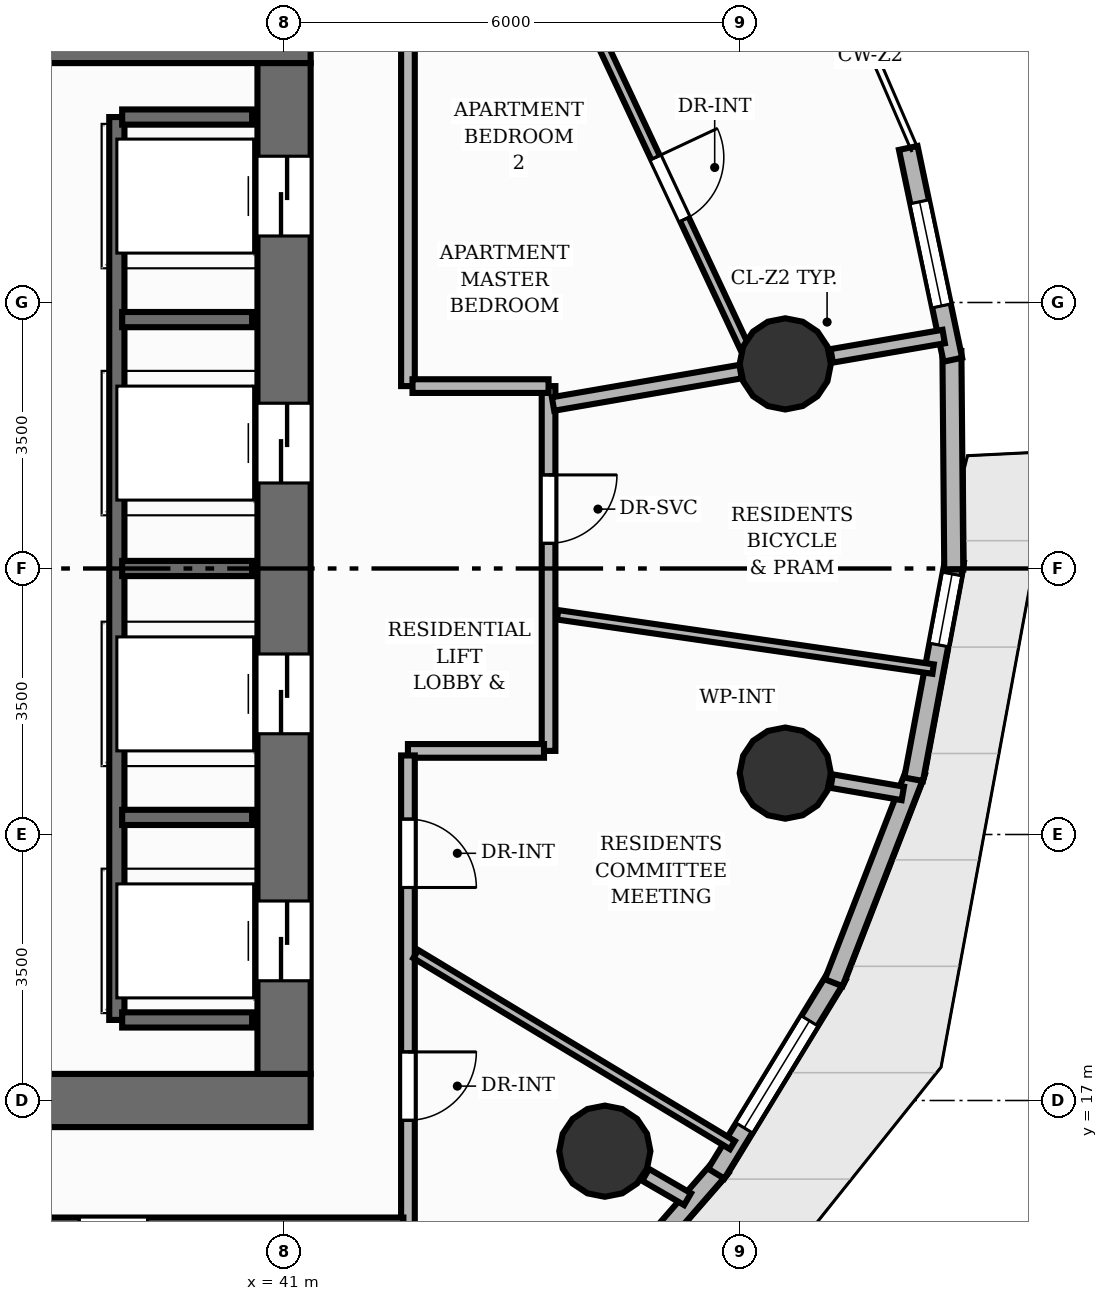
"""IFC4 building model, lengths in metres.
Left out: names, types, materials, properties, quantities, classifications, styles, units other than length and angle.
Written with IfcOpenShell. Run it as: python <this file> out.ifc"""

import sys

from ifc_helpers import new_model, si_unit, direction, frame, frame_2d, origin, origin_2d, place, context, subcontext, project, spatial, rectangle, circle, extrude, element, fill, save


model = new_model("IFC4")
c1 = context("Model", 3, precision=1e-05, world=origin(), true_north=direction((0.0, 1.0)))
c2 = subcontext(c1, "Body", "Model", "MODEL_VIEW")
j1 = project(units=[si_unit("LENGTHUNIT", "METRE"), si_unit("PLANEANGLEUNIT", "RADIAN")], contexts=[c1])
p1 = place(None, origin())
s1 = spatial("IfcSite", under=j1, at=p1, CompositionType="ELEMENT")
p2 = place(p1, origin())
s2 = spatial("IfcBuilding", under=s1, at=p2, CompositionType="ELEMENT")
p3 = place(p2, frame((0.0, 0.0, 77.28)))
s3 = spatial("IfcBuildingStorey", under=s2, at=p3, CompositionType="ELEMENT", Elevation=77.28)
p4 = place(p3, frame((22.65, 17.0, 0.0), z_axis=(0.0, 0.0, 1.0), x_axis=(1.0, 0.0, 0.0)))
e1 = element("IfcWall", 1, at=p4, inside=s3, PredefinedType="SHEAR", context=c2, shape_type="SweptSolid", body=[
    extrude(rectangle(XDim=18.7, YDim=0.7, at=frame_2d((9.35, 0.0))), origin(), (0.0, 0.0, 1.0), 3.2),
])
p5 = place(p4, frame((5.85, 0.0, 0.0)))
e2 = element("IfcOpeningElement", 2, at=p5, cuts=e1, PredefinedType="OPENING", context=c2, shape_type="SweptSolid", body=[
    extrude(rectangle(XDim=1.1, YDim=2.15, at=frame_2d((0.55, 1.075))), frame((0.0, 0.36, 0.0), z_axis=(0.0, -1.0, 0.0), x_axis=(1.0, 0.0, 0.0)), (0.0, 0.0, 1.0), 0.72),
])
p6 = place(p4, frame((9.4, 0.0, 0.0)))
e3 = element("IfcOpeningElement", 3, at=p6, cuts=e1, PredefinedType="OPENING", context=c2, shape_type="SweptSolid", body=[
    extrude(rectangle(XDim=0.9, YDim=2.1, at=frame_2d((0.45, 1.05))), frame((0.0, 0.36, 0.0), z_axis=(0.0, -1.0, 0.0), x_axis=(1.0, 0.0, 0.0)), (0.0, 0.0, 1.0), 0.72),
])
p7 = place(p3, frame((22.65, 31.0, 0.0), z_axis=(0.0, 0.0, 1.0), x_axis=(1.0, 0.0, 0.0)))
e4 = element("IfcWall", 4, at=p7, inside=s3, PredefinedType="SHEAR", context=c2, shape_type="SweptSolid", body=[
    extrude(rectangle(XDim=18.7, YDim=0.7, at=frame_2d((9.35, 0.0))), origin(), (0.0, 0.0, 1.0), 3.2),
])
p8 = place(p7, frame((11.75, 0.0, 0.0)))
e5 = element("IfcOpeningElement", 5, at=p8, cuts=e4, PredefinedType="OPENING", context=c2, shape_type="SweptSolid", body=[
    extrude(rectangle(XDim=1.1, YDim=2.15, at=frame_2d((0.55, 1.075))), frame((0.0, 0.36, 0.0), z_axis=(0.0, -1.0, 0.0), x_axis=(1.0, 0.0, 0.0)), (0.0, 0.0, 1.0), 0.72),
])
p9 = place(p3, frame((41.0, 17.35, 0.0), z_axis=(0.0, 0.0, 1.0), x_axis=(0.0, 1.0, 0.0)))
e6 = element("IfcWall", 6, at=p9, inside=s3, PredefinedType="SHEAR", context=c2, shape_type="SweptSolid", body=[
    extrude(rectangle(XDim=13.3, YDim=0.7, at=frame_2d((6.65, 0.0))), origin(), (0.0, 0.0, 1.0), 3.2),
])
p10 = place(p9, frame((1.225, 0.0, 0.0)))
e7 = element("IfcOpeningElement", 7, at=p10, cuts=e6, PredefinedType="OPENING", context=c2, shape_type="SweptSolid", body=[
    extrude(rectangle(XDim=1.05, YDim=2.15, at=frame_2d((0.525, 1.075))), frame((0.0, 0.36, 0.0), z_axis=(0.0, -1.0, 0.0), x_axis=(1.0, 0.0, 0.0)), (0.0, 0.0, 1.0), 0.72),
])
p11 = place(p9, frame((4.475, 0.0, 0.0)))
e8 = element("IfcOpeningElement", 8, at=p11, cuts=e6, PredefinedType="OPENING", context=c2, shape_type="SweptSolid", body=[
    extrude(rectangle(XDim=1.05, YDim=2.15, at=frame_2d((0.525, 1.075))), frame((0.0, 0.36, 0.0), z_axis=(0.0, -1.0, 0.0), x_axis=(1.0, 0.0, 0.0)), (0.0, 0.0, 1.0), 0.72),
])
p12 = place(p9, frame((7.775, 0.0, 0.0)))
e9 = element("IfcOpeningElement", 9, at=p12, cuts=e6, PredefinedType="OPENING", context=c2, shape_type="SweptSolid", body=[
    extrude(rectangle(XDim=1.05, YDim=2.15, at=frame_2d((0.525, 1.075))), frame((0.0, 0.36, 0.0), z_axis=(0.0, -1.0, 0.0), x_axis=(1.0, 0.0, 0.0)), (0.0, 0.0, 1.0), 0.72),
])
p13 = place(p9, frame((11.025, 0.0, 0.0)))
e10 = element("IfcOpeningElement", 10, at=p13, cuts=e6, PredefinedType="OPENING", context=c2, shape_type="SweptSolid", body=[
    extrude(rectangle(XDim=1.05, YDim=2.15, at=frame_2d((0.525, 1.075))), frame((0.0, 0.36, 0.0), z_axis=(0.0, -1.0, 0.0), x_axis=(1.0, 0.0, 0.0)), (0.0, 0.0, 1.0), 0.72),
])
for number, where, z_axis, x_axis in (
    (11, (47.594, 26.692, 0.0), (0.0, 0.0, 1.0), (1.0, 0.0, 0.0)),
    (12, (45.22, 16.333, 0.0), (0.0, 0.0, 1.0), (1.0, 0.0, 0.0)),
    (13, (47.594, 21.308, 0.0), (0.0, 0.0, 1.0), (1.0, 0.0, 0.0)),
):
    element("IfcColumn", number, at=place(p3, frame(where, z_axis=z_axis, x_axis=x_axis)), inside=s3, PredefinedType="COLUMN", context=c2, shape_type="SweptSolid", body=[
        extrude(circle(Radius=0.6, at=origin_2d()), origin(), (0.0, 0.0, 1.0), 3.2),
    ])
p14 = place(p3, frame((46.752, 16.127, 0.0), z_axis=(0.0, 0.0, 1.0), x_axis=(-0.656940925155, -0.753942054044, 0.0)))
e14 = element("IfcWall", 14, at=p14, inside=s3, PredefinedType="SOLIDWALL", context=c2, shape_type="SweptSolid", body=[
    extrude(rectangle(XDim=3.131, YDim=0.25, at=frame_2d((1.565, 0.0))), origin(), (0.0, 0.0, 1.0), 2.96),
])
p15 = place(p3, frame((48.281, 18.65, 0.0), z_axis=(0.0, 0.0, 1.0), x_axis=(-0.520956264952, -0.853583370273, 0.0)))
e15 = element("IfcWall", 15, at=p15, inside=s3, PredefinedType="SOLIDWALL", context=c2, shape_type="SweptSolid", body=[
    extrude(rectangle(XDim=3.061, YDim=0.25, at=frame_2d((1.53, 0.0))), origin(), (0.0, 0.0, 1.0), 2.96),
])
p16 = place(p15, frame((0.705, 0.0, 0.85)))
e16 = element("IfcOpeningElement", 16, at=p16, cuts=e15, PredefinedType="OPENING", context=c2, shape_type="SweptSolid", body=[
    extrude(rectangle(XDim=1.65, YDim=1.55, at=frame_2d((0.825, 0.775))), frame((0.0, 0.135, 0.0), z_axis=(0.0, -1.0, 0.0), x_axis=(1.0, 0.0, 0.0)), (0.0, 0.0, 1.0), 0.27),
])
p17 = place(p3, frame((49.314, 21.335, 0.0), z_axis=(0.0, 0.0, 1.0), x_axis=(-0.362414720493, -0.93201693674, 0.0)))
e17 = element("IfcWall", 17, at=p17, inside=s3, PredefinedType="SOLIDWALL", context=c2, shape_type="SweptSolid", body=[
    extrude(rectangle(XDim=2.988, YDim=0.25, at=frame_2d((1.494, 0.0))), origin(), (0.0, 0.0, 1.0), 2.96),
])
p18 = place(p3, frame((49.821, 24.1, 0.0), z_axis=(0.0, 0.0, 1.0), x_axis=(-0.183975908968, -0.982930752861, 0.0)))
e18 = element("IfcWall", 18, at=p18, inside=s3, PredefinedType="SOLIDWALL", context=c2, shape_type="SweptSolid", body=[
    extrude(rectangle(XDim=2.923, YDim=0.25, at=frame_2d((1.462, 0.0))), origin(), (0.0, 0.0, 1.0), 2.96),
])
p19 = place(p18, frame((0.175, 0.0, 0.85)))
e19 = element("IfcOpeningElement", 19, at=p19, cuts=e18, PredefinedType="OPENING", context=c2, shape_type="SweptSolid", body=[
    extrude(rectangle(XDim=0.95, YDim=1.45, at=frame_2d((0.475, 0.725))), frame((0.0, 0.135, 0.0), z_axis=(0.0, -1.0, 0.0), x_axis=(1.0, 0.0, 0.0)), (0.0, 0.0, 1.0), 0.27),
])
p20 = place(p3, frame((49.787, 26.861, 0.0), z_axis=(0.0, 0.0, 1.0), x_axis=(0.008580093639, -0.999963190319, 0.0)))
e20 = element("IfcWall", 20, at=p20, inside=s3, PredefinedType="SOLIDWALL", context=c2, shape_type="SweptSolid", body=[
    extrude(rectangle(XDim=2.874, YDim=0.25, at=frame_2d((1.437, 0.0))), origin(), (0.0, 0.0, 1.0), 2.96),
])
p21 = place(p3, frame((49.213, 29.533, 0.0), z_axis=(0.0, 0.0, 1.0), x_axis=(0.205949984324, -0.978562519187, 0.0)))
e21 = element("IfcWall", 21, at=p21, inside=s3, PredefinedType="SOLIDWALL", context=c2, shape_type="SweptSolid", body=[
    extrude(rectangle(XDim=2.847, YDim=0.25, at=frame_2d((1.424, 0.0))), origin(), (0.0, 0.0, 1.0), 2.96),
])
p22 = place(p21, frame((0.724, 0.0, 0.85)))
e22 = element("IfcOpeningElement", 22, at=p22, cuts=e21, PredefinedType="OPENING", context=c2, shape_type="SweptSolid", body=[
    extrude(rectangle(XDim=1.4, YDim=1.55, at=frame_2d((0.7, 0.775))), frame((0.0, 0.135, 0.0), z_axis=(0.0, -1.0, 0.0), x_axis=(1.0, 0.0, 0.0)), (0.0, 0.0, 1.0), 0.27),
])
p23 = place(p3, frame((38.8, 18.06, 0.0), z_axis=(0.0, 0.0, 1.0), x_axis=(0.0, 1.0, 0.0)))
e23 = element("IfcWall", 23, at=p23, inside=s3, PredefinedType="SHEAR", context=c2, shape_type="SweptSolid", body=[
    extrude(rectangle(XDim=11.88, YDim=0.2, at=frame_2d((5.94, 0.0))), origin(), (0.0, 0.0, 1.0), 3.2),
])
for number, where, z_axis, x_axis in (
    (24, (38.87, 18.06, 0.0), (0.0, 0.0, 1.0), (1.0, 0.0, 0.0)),
    (25, (38.87, 29.94, 0.0), (0.0, 0.0, 1.0), (1.0, 0.0, 0.0)),
    (26, (38.87, 20.725, 0.0), (0.0, 0.0, 1.0), (1.0, 0.0, 0.0)),
    (27, (38.87, 24.0, 0.0), (0.0, 0.0, 1.0), (1.0, 0.0, 0.0)),
    (28, (38.87, 27.275, 0.0), (0.0, 0.0, 1.0), (1.0, 0.0, 0.0)),
):
    element("IfcWall", number, at=place(p3, frame(where, z_axis=z_axis, x_axis=x_axis)), inside=s3, PredefinedType="SHEAR", context=c2, shape_type="SweptSolid", body=[
        extrude(rectangle(XDim=1.71, YDim=0.2, at=frame_2d((0.855, 0.0))), origin(), (0.0, 0.0, 1.0), 3.2),
    ])
p24 = place(p3, frame((48.206, 26.798, 0.0), z_axis=(0.0, 0.0, 1.0), x_axis=(0.985414821555, 0.170169413997, 0.0)))
e29 = element("IfcWall", 29, at=p24, inside=s3, PredefinedType="PARTITIONING", context=c2, shape_type="SweptSolid", body=[
    extrude(rectangle(XDim=1.495, YDim=0.18, at=frame_2d((0.748, 0.0))), origin(), (0.0, 0.0, 1.0), 2.26),
])
p25 = place(p3, frame((45.757, 16.022, 0.0), z_axis=(0.0, 0.0, 1.0), x_axis=(0.864928236137, -0.501895553212, 0.0)))
e30 = element("IfcWall", 30, at=p25, inside=s3, PredefinedType="PARTITIONING", context=c2, shape_type="SweptSolid", body=[
    extrude(rectangle(XDim=0.638, YDim=0.18, at=frame_2d((0.319, 0.0))), origin(), (0.0, 0.0, 1.0), 2.26),
])
p26 = place(p3, frame((48.206, 21.202, 0.0), z_axis=(0.0, 0.0, 1.0), x_axis=(0.985396187556, -0.170277284302, 0.0)))
e31 = element("IfcWall", 31, at=p26, inside=s3, PredefinedType="PARTITIONING", context=c2, shape_type="SweptSolid", body=[
    extrude(rectangle(XDim=0.949, YDim=0.18, at=frame_2d((0.475, 0.0))), origin(), (0.0, 0.0, 1.0), 2.26),
])
p27 = place(p3, frame((44.48, 26.4, 0.0), z_axis=(0.0, 0.0, 1.0), x_axis=(0.0, -1.0, 0.0)))
e32 = element("IfcWall", 32, at=p27, inside=s3, PredefinedType="PARTITIONING", context=c2, shape_type="SweptSolid", body=[
    extrude(rectangle(XDim=4.8, YDim=0.18, at=frame_2d((2.4, 0.0))), origin(), (0.0, 0.0, 1.0), 2.955),
])
p28 = place(p27, frame((1.169, 0.0, 0.0)))
e33 = element("IfcOpeningElement", 33, at=p28, cuts=e32, PredefinedType="OPENING", context=c2, shape_type="SweptSolid", body=[
    extrude(rectangle(XDim=0.9, YDim=2.1, at=frame_2d((0.45, 1.05))), frame((0.0, 0.1, 0.0), z_axis=(0.0, -1.0, 0.0), x_axis=(1.0, 0.0, 0.0)), (0.0, 0.0, 1.0), 0.2),
])
p29 = place(p3, frame((44.42, 21.6, 0.0), z_axis=(0.0, 0.0, 1.0), x_axis=(-1.0, 0.0, 0.0)))
e34 = element("IfcWall", 34, at=p29, inside=s3, PredefinedType="PARTITIONING", context=c2, shape_type="SweptSolid", body=[
    extrude(rectangle(XDim=1.79, YDim=0.18, at=frame_2d((0.895, 0.0))), origin(), (0.0, 0.0, 1.0), 2.26),
])
p30 = place(p3, frame((42.63, 21.54, 0.0), z_axis=(0.0, 0.0, 1.0), x_axis=(0.0, -1.0, 0.0)))
e35 = element("IfcWall", 35, at=p30, inside=s3, PredefinedType="PARTITIONING", context=c2, shape_type="SweptSolid", body=[
    extrude(rectangle(XDim=6.17, YDim=0.18, at=frame_2d((3.085, 0.0))), origin(), (0.0, 0.0, 1.0), 2.955),
])
p31 = place(p30, frame((0.837, 0.0, 0.0)))
e36 = element("IfcOpeningElement", 36, at=p31, cuts=e35, PredefinedType="OPENING", context=c2, shape_type="SweptSolid", body=[
    extrude(rectangle(XDim=0.9, YDim=2.1, at=frame_2d((0.45, 1.05))), frame((0.0, 0.1, 0.0), z_axis=(0.0, -1.0, 0.0), x_axis=(1.0, 0.0, 0.0)), (0.0, 0.0, 1.0), 0.2),
])
p32 = place(p30, frame((3.901, 0.0, 0.0)))
e37 = element("IfcOpeningElement", 37, at=p32, cuts=e35, PredefinedType="OPENING", context=c2, shape_type="SweptSolid", body=[
    extrude(rectangle(XDim=0.9, YDim=2.1, at=frame_2d((0.45, 1.05))), frame((0.0, 0.1, 0.0), z_axis=(0.0, -1.0, 0.0), x_axis=(1.0, 0.0, 0.0)), (0.0, 0.0, 1.0), 0.2),
])
p33 = place(p3, frame((42.57, 15.37, 0.0), z_axis=(0.0, 0.0, 1.0), x_axis=(-1.0, 0.0, 0.0)))
e38 = element("IfcWall", 38, at=p33, inside=s3, PredefinedType="PARTITIONING", context=c2, shape_type="SweptSolid", body=[
    extrude(rectangle(XDim=11.879, YDim=0.18, at=frame_2d((5.939, 0.0))), origin(), (0.0, 0.0, 1.0), 2.955),
])
p34 = place(p33, frame((3.365, 0.0, 0.0)))
e39 = element("IfcOpeningElement", 39, at=p34, cuts=e38, PredefinedType="OPENING", context=c2, shape_type="SweptSolid", body=[
    extrude(rectangle(XDim=0.9, YDim=2.1, at=frame_2d((0.45, 1.05))), frame((0.0, 0.1, 0.0), z_axis=(0.0, -1.0, 0.0), x_axis=(1.0, 0.0, 0.0)), (0.0, 0.0, 1.0), 0.2),
])
p35 = place(p33, frame((6.308, 0.0, 0.0)))
e40 = element("IfcOpeningElement", 40, at=p35, cuts=e38, PredefinedType="OPENING", context=c2, shape_type="SweptSolid", body=[
    extrude(rectangle(XDim=0.9, YDim=2.1, at=frame_2d((0.45, 1.05))), frame((0.0, 0.1, 0.0), z_axis=(0.0, -1.0, 0.0), x_axis=(1.0, 0.0, 0.0)), (0.0, 0.0, 1.0), 0.2),
])
p36 = place(p3, frame((42.63, 32.63, 0.0), z_axis=(0.0, 0.0, 1.0), x_axis=(0.0, -1.0, 0.0)))
e41 = element("IfcWall", 41, at=p36, inside=s3, PredefinedType="PARTITIONING", context=c2, shape_type="SweptSolid", body=[
    extrude(rectangle(XDim=6.23, YDim=0.18, at=frame_2d((3.115, 0.0))), origin(), (0.0, 0.0, 1.0), 2.955),
])
p37 = place(p3, frame((42.69, 26.4, 0.0), z_axis=(0.0, 0.0, 1.0), x_axis=(1.0, 0.0, 0.0)))
e42 = element("IfcWall", 42, at=p37, inside=s3, PredefinedType="PARTITIONING", context=c2, shape_type="SweptSolid", body=[
    extrude(rectangle(XDim=1.79, YDim=0.18, at=frame_2d((0.895, 0.0))), origin(), (0.0, 0.0, 1.0), 2.26),
])
p38 = place(p3, frame((49.54, 22.677, 0.0), z_axis=(0.0, 0.0, 1.0), x_axis=(-0.989708433574, 0.143098625124, 0.0)))
e43 = element("IfcWall", 43, at=p38, inside=s3, PredefinedType="PARTITIONING", context=c2, shape_type="SweptSolid", body=[
    extrude(rectangle(XDim=4.992, YDim=0.125, at=frame_2d((2.496, 0.0))), origin(), (0.0, 0.0, 1.0), 2.641),
])
p39 = place(p3, frame((44.539, 26.165, 0.0), z_axis=(0.0, 0.0, 1.0), x_axis=(0.985420684403, 0.170135460006, 0.0)))
e44 = element("IfcWall", 44, at=p39, inside=s3, PredefinedType="PARTITIONING", context=c2, shape_type="SweptSolid", body=[
    extrude(rectangle(XDim=2.504, YDim=0.18, at=frame_2d((1.252, 0.0))), origin(), (0.0, 0.0, 1.0), 2.26),
])
p40 = place(p3, frame((46.898, 16.414, 0.0), z_axis=(0.0, 0.0, 1.0), x_axis=(-0.856255019026, 0.51655332967, 0.0)))
e45 = element("IfcWall", 45, at=p40, inside=s3, PredefinedType="PARTITIONING", context=c2, shape_type="SweptSolid", body=[
    extrude(rectangle(XDim=4.865, YDim=0.125, at=frame_2d((2.432, 0.0))), origin(), (0.0, 0.0, 1.0), 2.955),
])
p41 = place(p3, frame((45.098, 31.087, 0.0), z_axis=(0.0, 0.0, 1.0), x_axis=(0.424725570062, -0.905322147158, 0.0)))
e46 = element("IfcWall", 46, at=p41, inside=s3, PredefinedType="PARTITIONING", context=c2, shape_type="SweptSolid", body=[
    extrude(rectangle(XDim=4.61, YDim=0.125, at=frame_2d((2.305, 0.0))), origin(), (0.0, 0.0, 1.0), 2.955),
])
p42 = place(p41, frame((1.855, 0.0, 0.0)))
e47 = element("IfcOpeningElement", 47, at=p42, cuts=e46, PredefinedType="OPENING", context=c2, shape_type="SweptSolid", body=[
    extrude(rectangle(XDim=0.9, YDim=2.1, at=frame_2d((0.45, 1.05))), frame((0.0, 0.073, 0.0), z_axis=(0.0, -1.0, 0.0), x_axis=(1.0, 0.0, 0.0)), (0.0, 0.0, 1.0), 0.145),
])
p43 = place(p16, origin())
e48 = element("IfcWindow", 48, at=p43, inside=s3, PartitioningType="SINGLE_PANEL", PredefinedType="WINDOW", context=c2, shape_type="SweptSolid", body=[
    extrude(rectangle(XDim=1.65, YDim=1.55, at=frame_2d((0.825, 0.775))), frame((0.0, 0.03, 0.0), z_axis=(0.0, -1.0, 0.0), x_axis=(1.0, 0.0, 0.0)), (0.0, 0.0, 1.0), 0.06),
])
fill(e16, e48)
p44 = place(p19, origin())
e49 = element("IfcWindow", 49, at=p44, inside=s3, PartitioningType="SINGLE_PANEL", PredefinedType="WINDOW", context=c2, shape_type="SweptSolid", body=[
    extrude(rectangle(XDim=0.95, YDim=1.45, at=frame_2d((0.475, 0.725))), frame((0.0, 0.03, 0.0), z_axis=(0.0, -1.0, 0.0), x_axis=(1.0, 0.0, 0.0)), (0.0, 0.0, 1.0), 0.06),
])
fill(e19, e49)
p45 = place(p22, origin())
e50 = element("IfcWindow", 50, at=p45, inside=s3, PartitioningType="SINGLE_PANEL", PredefinedType="WINDOW", context=c2, shape_type="SweptSolid", body=[
    extrude(rectangle(XDim=1.4, YDim=1.55, at=frame_2d((0.7, 0.775))), frame((0.0, 0.03, 0.0), z_axis=(0.0, -1.0, 0.0), x_axis=(1.0, 0.0, 0.0)), (0.0, 0.0, 1.0), 0.06),
])
fill(e22, e50)
p46 = place(p10, origin())
e51 = element("IfcDoor", 51, at=p46, inside=s3, OperationType="DOUBLE_DOOR_SLIDING", PredefinedType="DOOR", context=c2, shape_type="SweptSolid", body=[
    extrude(rectangle(XDim=1.05, YDim=2.15, at=frame_2d((0.525, 1.075))), frame((0.0, 0.025, 0.0), z_axis=(0.0, -1.0, 0.0), x_axis=(1.0, 0.0, 0.0)), (0.0, 0.0, 1.0), 0.05),
])
fill(e7, e51)
p47 = place(p11, origin())
e52 = element("IfcDoor", 52, at=p47, inside=s3, OperationType="DOUBLE_DOOR_SLIDING", PredefinedType="DOOR", context=c2, shape_type="SweptSolid", body=[
    extrude(rectangle(XDim=1.05, YDim=2.15, at=frame_2d((0.525, 1.075))), frame((0.0, 0.025, 0.0), z_axis=(0.0, -1.0, 0.0), x_axis=(1.0, 0.0, 0.0)), (0.0, 0.0, 1.0), 0.05),
])
fill(e8, e52)
p48 = place(p12, origin())
e53 = element("IfcDoor", 53, at=p48, inside=s3, OperationType="DOUBLE_DOOR_SLIDING", PredefinedType="DOOR", context=c2, shape_type="SweptSolid", body=[
    extrude(rectangle(XDim=1.05, YDim=2.15, at=frame_2d((0.525, 1.075))), frame((0.0, 0.025, 0.0), z_axis=(0.0, -1.0, 0.0), x_axis=(1.0, 0.0, 0.0)), (0.0, 0.0, 1.0), 0.05),
])
fill(e9, e53)
p49 = place(p13, origin())
e54 = element("IfcDoor", 54, at=p49, inside=s3, OperationType="DOUBLE_DOOR_SLIDING", PredefinedType="DOOR", context=c2, shape_type="SweptSolid", body=[
    extrude(rectangle(XDim=1.05, YDim=2.15, at=frame_2d((0.525, 1.075))), frame((0.0, 0.025, 0.0), z_axis=(0.0, -1.0, 0.0), x_axis=(1.0, 0.0, 0.0)), (0.0, 0.0, 1.0), 0.05),
])
fill(e10, e54)
p50 = place(p28, origin())
e55 = element("IfcDoor", 55, at=p50, inside=s3, OperationType="SINGLE_SWING_LEFT", PredefinedType="DOOR", context=c2, shape_type="SweptSolid", body=[
    extrude(rectangle(XDim=0.9, YDim=2.1, at=frame_2d((0.45, 1.05))), frame((0.0, 0.025, 0.0), z_axis=(0.0, -1.0, 0.0), x_axis=(1.0, 0.0, 0.0)), (0.0, 0.0, 1.0), 0.05),
])
fill(e33, e55)
p51 = place(p31, origin())
e56 = element("IfcDoor", 56, at=p51, inside=s3, OperationType="SINGLE_SWING_RIGHT", PredefinedType="DOOR", context=c2, shape_type="SweptSolid", body=[
    extrude(rectangle(XDim=0.9, YDim=2.1, at=frame_2d((0.45, 1.05))), frame((0.0, 0.025, 0.0), z_axis=(0.0, -1.0, 0.0), x_axis=(1.0, 0.0, 0.0)), (0.0, 0.0, 1.0), 0.05),
])
fill(e36, e56)
p52 = place(p32, origin())
e57 = element("IfcDoor", 57, at=p52, inside=s3, OperationType="SINGLE_SWING_LEFT", PredefinedType="DOOR", context=c2, shape_type="SweptSolid", body=[
    extrude(rectangle(XDim=0.9, YDim=2.1, at=frame_2d((0.45, 1.05))), frame((0.0, 0.025, 0.0), z_axis=(0.0, -1.0, 0.0), x_axis=(1.0, 0.0, 0.0)), (0.0, 0.0, 1.0), 0.05),
])
fill(e37, e57)
p53 = place(p42, origin())
e58 = element("IfcDoor", 58, at=p53, inside=s3, OperationType="SINGLE_SWING_LEFT", PredefinedType="DOOR", context=c2, shape_type="SweptSolid", body=[
    extrude(rectangle(XDim=0.9, YDim=2.1, at=frame_2d((0.45, 1.05))), frame((0.0, 0.025, 0.0), z_axis=(0.0, -1.0, 0.0), x_axis=(1.0, 0.0, 0.0)), (0.0, 0.0, 1.0), 0.05),
])
fill(e47, e58)
save(model, sys.argv[1])
